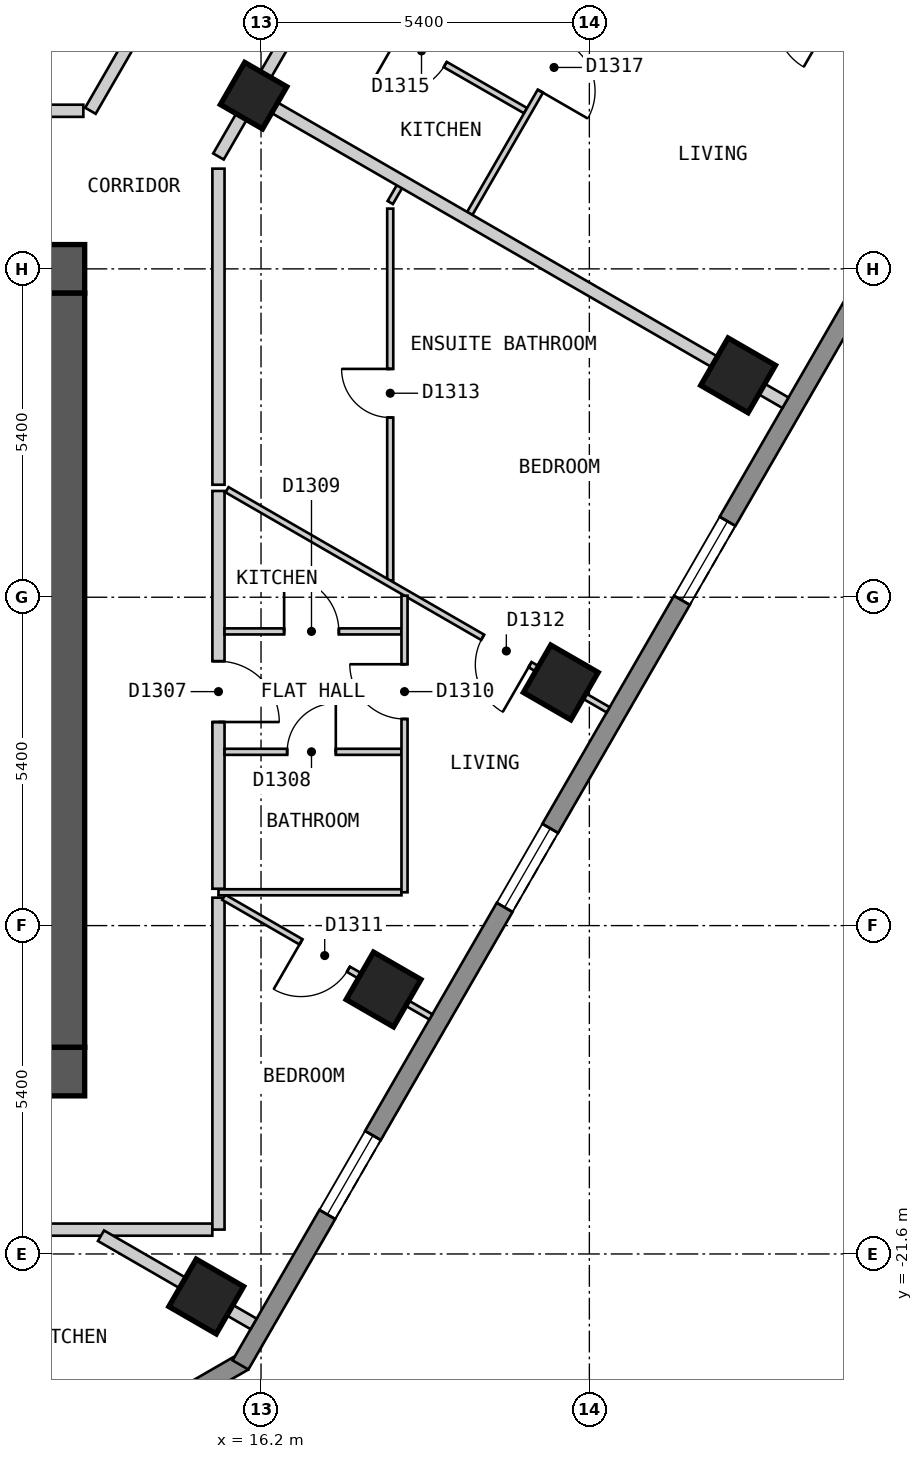
"""IFC4 building model, lengths in metres.
Left out: names, types, materials, properties, quantities, classifications, styles, units other than length and angle.
Written with IfcOpenShell. Run it as: python <this file> out.ifc"""

import sys

from ifc_helpers import new_model, si_unit, direction, frame, frame_2d, origin, origin_2d, place, context, subcontext, project, spatial, polyline, rectangle, outline, extrude, element, fill, save


model = new_model("IFC4")
c1 = context("Model", 3, precision=1e-05, world=origin(), true_north=direction((0.0, 1.0)))
c2 = subcontext(c1, "Body", "Model", "MODEL_VIEW")
j1 = project(units=[si_unit("LENGTHUNIT", "METRE"), si_unit("PLANEANGLEUNIT", "RADIAN")], contexts=[c1])
p1 = place(None, origin())
s1 = spatial("IfcSite", under=j1, at=p1, CompositionType="ELEMENT")
p2 = place(p1, origin())
s2 = spatial("IfcBuilding", under=s1, at=p2, CompositionType="ELEMENT")
p3 = place(p2, frame((0.0, 0.0, 147.6)))
s3 = spatial("IfcBuildingStorey", under=s2, at=p3, CompositionType="ELEMENT", Elevation=147.6)
for number, where, z_axis, x_axis in (
    (1, (15.299, -22.3, 0.0), (0.0, 0.0, 1.0), (0.5, 0.866, 0.0)),
    (2, (18.215, -17.251, 0.0), (0.0, 0.0, 1.0), (0.5, 0.866, 0.0)),
    (3, (21.13, -12.201, 0.0), (0.0, 0.0, 1.0), (0.5, 0.866, 0.0)),
    (4, (24.046, -7.151, 0.0), (0.0, 0.0, 1.0), (0.5, 0.866, 0.0)),
):
    element("IfcColumn", number, at=place(p3, frame(where, z_axis=z_axis, x_axis=x_axis)), inside=s3, PredefinedType="COLUMN", context=c2, shape_type="SweptSolid", body=[
        extrude(rectangle(XDim=0.9, YDim=0.9, at=origin_2d()), origin(), (0.0, 0.0, 1.0), 3.0),
    ])
p4 = place(p3, frame((16.078, -2.551, 0.0), z_axis=(0.0, 0.0, 1.0), x_axis=(0.5, 0.866025403784, 0.0)))
e5 = element("IfcColumn", 5, at=p4, inside=s3, PredefinedType="COLUMN", context=c2, shape_type="SweptSolid", body=[
    extrude(rectangle(XDim=0.8, YDim=0.8, at=origin_2d()), origin(), (0.0, 0.0, 1.0), 3.0),
])
p5 = place(p3, frame((-13.3, -18.6, 0.0), z_axis=(0.0, 0.0, 1.0), x_axis=(1.0, 0.0, 0.0)))
e6 = element("IfcWall", 6, at=p5, inside=s3, PredefinedType="SHEAR", context=c2, shape_type="SweptSolid", body=[
    extrude(rectangle(XDim=26.6, YDim=0.8, at=frame_2d((13.3, 0.0))), origin(), (0.0, 0.0, 1.0), 2.7),
])
p6 = place(p3, frame((-13.3, -5.4, 0.0), z_axis=(0.0, 0.0, 1.0), x_axis=(1.0, 0.0, 0.0)))
e7 = element("IfcWall", 7, at=p6, inside=s3, PredefinedType="SHEAR", context=c2, shape_type="SweptSolid", body=[
    extrude(rectangle(XDim=26.6, YDim=0.8, at=frame_2d((13.3, 0.0))), origin(), (0.0, 0.0, 1.0), 2.7),
])
p7 = place(p6, frame((23.65, 0.0, 0.0)))
e8 = element("IfcOpeningElement", 8, at=p7, cuts=e7, PredefinedType="OPENING", context=c2, shape_type="SweptSolid", body=[
    extrude(rectangle(XDim=1.2, YDim=2.1, at=frame_2d((0.6, 1.05))), frame((0.0, 0.41, 0.0), z_axis=(0.0, -1.0, 0.0), x_axis=(1.0, 0.0, 0.0)), (0.0, 0.0, 1.0), 0.82),
])
p8 = place(p3, frame((12.9, -18.2, 0.0), z_axis=(0.0, 0.0, 1.0), x_axis=(0.0, 1.0, 0.0)))
e9 = element("IfcWall", 9, at=p8, inside=s3, PredefinedType="SHEAR", context=c2, shape_type="SweptSolid", body=[
    extrude(rectangle(XDim=12.4, YDim=0.8, at=frame_2d((6.2, 0.0))), origin(), (0.0, 0.0, 1.0), 2.7),
])
p9 = place(p3, frame((11.587, -25.87, 0.0), z_axis=(0.0, 0.0, 1.0), x_axis=(0.866022959057, 0.500004234368, 0.0)))
e10 = element("IfcWall", 10, at=p9, inside=s3, PredefinedType="SOLIDWALL", context=c2, shape_type="SweptSolid", body=[
    extrude(outline(polyline([(0.0, -0.15), (5.0, -0.15), (4.92, 0.15), (0.08, 0.15), (0.0, -0.15)])), origin(), (0.0, 0.0, 1.0), 2.7),
])
p10 = place(p9, frame((0.65, 0.0, 0.15)))
e11 = element("IfcOpeningElement", 11, at=p10, cuts=e10, PredefinedType="OPENING", context=c2, shape_type="SweptSolid", body=[
    extrude(rectangle(XDim=1.2, YDim=2.1, at=frame_2d((0.6, 1.05))), frame((0.0, 0.16, 0.0), z_axis=(0.0, -1.0, 0.0), x_axis=(1.0, 0.0, 0.0)), (0.0, 0.0, 1.0), 0.32),
])
p11 = place(p3, frame((15.862, -23.425, 0.0), z_axis=(0.0, 0.0, 1.0), x_axis=(0.500017503135, 0.866015298109, 0.0)))
e12 = element("IfcWall", 12, at=p11, inside=s3, PredefinedType="SOLIDWALL", context=c2, shape_type="SweptSolid", body=[
    extrude(outline(polyline([(0.0, -0.15), (24.711, -0.15), (24.631, 0.15), (0.08, 0.15), (0.0, -0.15)])), origin(), (0.0, 0.0, 1.0), 2.7),
])
p12 = place(p11, frame((2.857, 0.0, 0.15)))
e13 = element("IfcOpeningElement", 13, at=p12, cuts=e12, PredefinedType="OPENING", context=c2, shape_type="SweptSolid", body=[
    extrude(rectangle(XDim=1.5, YDim=2.1, at=frame_2d((0.75, 1.05))), frame((0.0, 0.16, 0.0), z_axis=(0.0, -1.0, 0.0), x_axis=(1.0, 0.0, 0.0)), (0.0, 0.0, 1.0), 0.32),
])
p13 = place(p11, frame((8.689, 0.0, 0.15)))
e14 = element("IfcOpeningElement", 14, at=p13, cuts=e12, PredefinedType="OPENING", context=c2, shape_type="SweptSolid", body=[
    extrude(rectangle(XDim=1.5, YDim=2.1, at=frame_2d((0.75, 1.05))), frame((0.0, 0.16, 0.0), z_axis=(0.0, -1.0, 0.0), x_axis=(1.0, 0.0, 0.0)), (0.0, 0.0, 1.0), 0.32),
])
p14 = place(p11, frame((14.52, 0.0, 0.15)))
e15 = element("IfcOpeningElement", 15, at=p14, cuts=e12, PredefinedType="OPENING", context=c2, shape_type="SweptSolid", body=[
    extrude(rectangle(XDim=1.5, YDim=2.1, at=frame_2d((0.75, 1.05))), frame((0.0, 0.16, 0.0), z_axis=(0.0, -1.0, 0.0), x_axis=(1.0, 0.0, 0.0)), (0.0, 0.0, 1.0), 0.32),
])
p15 = place(p11, frame((20.351, 0.0, 0.15)))
e16 = element("IfcOpeningElement", 16, at=p15, cuts=e12, PredefinedType="OPENING", context=c2, shape_type="SweptSolid", body=[
    extrude(rectangle(XDim=1.5, YDim=2.1, at=frame_2d((0.75, 1.05))), frame((0.0, 0.16, 0.0), z_axis=(0.0, -1.0, 0.0), x_axis=(1.0, 0.0, 0.0)), (0.0, 0.0, 1.0), 0.32),
])
p16 = place(p3, frame((15.5, -3.752, 0.0), z_axis=(0.0, 0.0, 1.0), x_axis=(0.0, -1.0, 0.0)))
e17 = element("IfcWall", 17, at=p16, inside=s3, PredefinedType="PARTITIONING", context=c2, shape_type="SweptSolid", body=[
    extrude(rectangle(XDim=5.198, YDim=0.2, at=frame_2d((2.599, 0.0))), origin(), (0.0, 0.0, 1.0), 2.7),
])
p17 = place(p3, frame((-15.4, -21.2, 0.0), z_axis=(0.0, 0.0, 1.0), x_axis=(1.0, 0.0, 0.0)))
e18 = element("IfcWall", 18, at=p17, inside=s3, PredefinedType="PARTITIONING", context=c2, shape_type="SweptSolid", body=[
    extrude(rectangle(XDim=30.799, YDim=0.2, at=frame_2d((15.399, 0.0))), origin(), (0.0, 0.0, 1.0), 2.7),
])
p18 = place(p17, frame((17.643, 0.0, 0.0)))
e19 = element("IfcOpeningElement", 19, at=p18, cuts=e18, PredefinedType="OPENING", context=c2, shape_type="SweptSolid", body=[
    extrude(rectangle(XDim=1.0, YDim=2.1, at=frame_2d((0.5, 1.05))), frame((0.0, 0.11, 0.0), z_axis=(0.0, -1.0, 0.0), x_axis=(1.0, 0.0, 0.0)), (0.0, 0.0, 1.0), 0.22),
])
p19 = place(p17, frame((2.765, 0.0, 0.0)))
e20 = element("IfcOpeningElement", 20, at=p19, cuts=e18, PredefinedType="OPENING", context=c2, shape_type="SweptSolid", body=[
    extrude(rectangle(XDim=0.8, YDim=2.1, at=frame_2d((0.4, 1.05))), frame((0.0, 0.11, 0.0), z_axis=(0.0, -1.0, 0.0), x_axis=(1.0, 0.0, 0.0)), (0.0, 0.0, 1.0), 0.22),
])
p20 = place(p3, frame((7.028, -2.8, 0.0), z_axis=(0.0, 0.0, 1.0), x_axis=(1.0, 0.0, 0.0)))
e21 = element("IfcWall", 21, at=p20, inside=s3, PredefinedType="PARTITIONING", context=c2, shape_type="SweptSolid", body=[
    extrude(rectangle(XDim=6.25, YDim=0.2, at=frame_2d((3.125, 0.0))), origin(), (0.0, 0.0, 1.0), 2.7),
])
p21 = place(p3, frame((13.394, -2.8, 0.0), z_axis=(0.0, 0.0, 1.0), x_axis=(0.499968324138, 0.866043691079, 0.0)))
e22 = element("IfcWall", 22, at=p21, inside=s3, PredefinedType="PARTITIONING", context=c2, shape_type="SweptSolid", body=[
    extrude(rectangle(XDim=3.696, YDim=0.2, at=frame_2d((1.848, 0.0))), origin(), (0.0, 0.0, 1.0), 2.7),
])
p22 = place(p3, frame((15.5, -3.552, 0.0), z_axis=(0.0, 0.0, 1.0), x_axis=(0.499928303779, 0.86606679366, 0.0)))
e23 = element("IfcWall", 23, at=p22, inside=s3, PredefinedType="PARTITIONING", context=c2, shape_type="SweptSolid", body=[
    extrude(rectangle(XDim=4.449, YDim=0.2, at=frame_2d((2.225, 0.0))), origin(), (0.0, 0.0, 1.0), 2.7),
])
p23 = place(p22, frame((3.432, 0.0, 0.0)))
e24 = element("IfcOpeningElement", 24, at=p23, cuts=e23, PredefinedType="OPENING", context=c2, shape_type="SweptSolid", body=[
    extrude(rectangle(XDim=0.8, YDim=2.1, at=frame_2d((0.4, 1.05))), frame((0.0, 0.11, 0.0), z_axis=(0.0, -1.0, 0.0), x_axis=(1.0, 0.0, 0.0)), (0.0, 0.0, 1.0), 0.22),
])
p24 = place(p3, frame((15.5, -21.199, 0.0), z_axis=(0.0, 0.0, 1.0), x_axis=(0.0, 1.0, 0.0)))
e25 = element("IfcWall", 25, at=p24, inside=s3, PredefinedType="PARTITIONING", context=c2, shape_type="SweptSolid", body=[
    extrude(rectangle(XDim=5.458, YDim=0.2, at=frame_2d((2.729, 0.0))), origin(), (0.0, 0.0, 1.0), 2.7),
])
p25 = place(p3, frame((15.5, -15.594, 0.0), z_axis=(0.0, 0.0, 1.0), x_axis=(0.0, 1.0, 0.0)))
e26 = element("IfcWall", 26, at=p25, inside=s3, PredefinedType="PARTITIONING", context=c2, shape_type="SweptSolid", body=[
    extrude(rectangle(XDim=6.542, YDim=0.2, at=frame_2d((3.271, 0.0))), origin(), (0.0, 0.0, 1.0), 2.7),
])
p26 = place(p25, frame((2.742, 0.0, 0.0)))
e27 = element("IfcOpeningElement", 27, at=p26, cuts=e26, PredefinedType="OPENING", context=c2, shape_type="SweptSolid", body=[
    extrude(rectangle(XDim=1.0, YDim=2.1, at=frame_2d((0.5, 1.05))), frame((0.0, 0.11, 0.0), z_axis=(0.0, -1.0, 0.0), x_axis=(1.0, 0.0, 0.0)), (0.0, 0.0, 1.0), 0.22),
])
p27 = place(p3, frame((18.325, -4.409, 0.0), z_axis=(0.0, 0.0, 1.0), x_axis=(0.0, -1.0, 0.0)))
e28 = element("IfcWall", 28, at=p27, inside=s3, PredefinedType="PARTITIONING", context=c2, shape_type="SweptSolid", body=[
    extrude(rectangle(XDim=6.115, YDim=0.1, at=frame_2d((3.058, 0.0))), origin(), (0.0, 0.0, 1.0), 2.7),
])
p28 = place(p27, frame((2.636, 0.0, 0.0)))
e29 = element("IfcOpeningElement", 29, at=p28, cuts=e28, PredefinedType="OPENING", context=c2, shape_type="SweptSolid", body=[
    extrude(rectangle(XDim=0.8, YDim=2.1, at=frame_2d((0.4, 1.05))), frame((0.0, 0.06, 0.0), z_axis=(0.0, -1.0, 0.0), x_axis=(1.0, 0.0, 0.0)), (0.0, 0.0, 1.0), 0.12),
])
p29 = place(p3, frame((15.587, -15.734, 0.0), z_axis=(0.0, 0.0, 1.0), x_axis=(0.866023334807, -0.500003583557, 0.0)))
e30 = element("IfcWall", 30, at=p29, inside=s3, PredefinedType="PARTITIONING", context=c2, shape_type="SweptSolid", body=[
    extrude(rectangle(XDim=3.934, YDim=0.1, at=frame_2d((1.967, 0.0))), origin(), (0.0, 0.0, 1.0), 2.7),
])
p30 = place(p29, frame((1.467, 0.0, 0.0)))
e31 = element("IfcOpeningElement", 31, at=p30, cuts=e30, PredefinedType="OPENING", context=c2, shape_type="SweptSolid", body=[
    extrude(rectangle(XDim=0.9, YDim=2.1, at=frame_2d((0.45, 1.05))), frame((0.0, 0.06, 0.0), z_axis=(0.0, -1.0, 0.0), x_axis=(1.0, 0.0, 0.0)), (0.0, 0.0, 1.0), 0.12),
])
p31 = place(p3, frame((15.641, -9.032, 0.0), z_axis=(0.0, 0.0, 1.0), x_axis=(0.866049104564, -0.499958946799, 0.0)))
e32 = element("IfcWall", 32, at=p31, inside=s3, PredefinedType="PARTITIONING", context=c2, shape_type="SweptSolid", body=[
    extrude(rectangle(XDim=7.238, YDim=0.1, at=frame_2d((3.619, 0.0))), origin(), (0.0, 0.0, 1.0), 2.7),
])
p32 = place(p31, frame((4.854, 0.0, 0.0)))
e33 = element("IfcOpeningElement", 33, at=p32, cuts=e32, PredefinedType="OPENING", context=c2, shape_type="SweptSolid", body=[
    extrude(rectangle(XDim=0.9, YDim=2.1, at=frame_2d((0.45, 1.05))), frame((0.0, 0.06, 0.0), z_axis=(0.0, -1.0, 0.0), x_axis=(1.0, 0.0, 0.0)), (0.0, 0.0, 1.0), 0.12),
])
p33 = place(p3, frame((17.171, -0.857, 0.0), z_axis=(0.0, 0.0, 1.0), x_axis=(0.867173455867, -0.49800622229, 0.0)))
e34 = element("IfcWall", 34, at=p33, inside=s3, PredefinedType="PARTITIONING", context=c2, shape_type="SweptSolid", body=[
    extrude(rectangle(XDim=3.898, YDim=0.1, at=frame_2d((1.949, 0.0))), origin(), (0.0, 0.0, 1.0), 2.7),
])
p34 = place(p33, frame((1.474, 0.0, 0.0)))
e35 = element("IfcOpeningElement", 35, at=p34, cuts=e34, PredefinedType="OPENING", context=c2, shape_type="SweptSolid", body=[
    extrude(rectangle(XDim=0.9, YDim=2.1, at=frame_2d((0.45, 1.05))), frame((0.0, 0.06, 0.0), z_axis=(0.0, -1.0, 0.0), x_axis=(1.0, 0.0, 0.0)), (0.0, 0.0, 1.0), 0.12),
])
p35 = place(p3, frame((22.729, 0.343, 0.0), z_axis=(0.0, 0.0, 1.0), x_axis=(0.865996608848, -0.500049870977, 0.0)))
e36 = element("IfcWall", 36, at=p35, inside=s3, PredefinedType="PARTITIONING", context=c2, shape_type="SweptSolid", body=[
    extrude(rectangle(XDim=5.788, YDim=0.1, at=frame_2d((2.894, 0.0))), origin(), (0.0, 0.0, 1.0), 2.7),
])
p36 = place(p35, frame((2.386, 0.0, 0.0)))
e37 = element("IfcOpeningElement", 37, at=p36, cuts=e36, PredefinedType="OPENING", context=c2, shape_type="SweptSolid", body=[
    extrude(rectangle(XDim=0.9, YDim=2.1, at=frame_2d((0.45, 1.05))), frame((0.0, 0.06, 0.0), z_axis=(0.0, -1.0, 0.0), x_axis=(1.0, 0.0, 0.0)), (0.0, 0.0, 1.0), 0.12),
])
p37 = place(p3, frame((15.6, -11.362, 0.0), z_axis=(0.0, 0.0, 1.0), x_axis=(1.0, 0.0, 0.0)))
e38 = element("IfcWall", 38, at=p37, inside=s3, PredefinedType="PARTITIONING", context=c2, shape_type="SweptSolid", body=[
    extrude(rectangle(XDim=2.91, YDim=0.1, at=frame_2d((1.455, 0.0))), origin(), (0.0, 0.0, 1.0), 2.7),
])
p38 = place(p37, frame((0.98, 0.0, 0.0)))
e39 = element("IfcOpeningElement", 39, at=p38, cuts=e38, PredefinedType="OPENING", context=c2, shape_type="SweptSolid", body=[
    extrude(rectangle(XDim=0.9, YDim=2.1, at=frame_2d((0.45, 1.05))), frame((0.0, 0.06, 0.0), z_axis=(0.0, -1.0, 0.0), x_axis=(1.0, 0.0, 0.0)), (0.0, 0.0, 1.0), 0.12),
])
p39 = place(p3, frame((15.6, -13.342, 0.0), z_axis=(0.0, 0.0, 1.0), x_axis=(1.0, 0.0, 0.0)))
e40 = element("IfcWall", 40, at=p39, inside=s3, PredefinedType="PARTITIONING", context=c2, shape_type="SweptSolid", body=[
    extrude(rectangle(XDim=2.91, YDim=0.1, at=frame_2d((1.455, 0.0))), origin(), (0.0, 0.0, 1.0), 2.7),
])
p40 = place(p39, frame((1.03, 0.0, 0.0)))
e41 = element("IfcOpeningElement", 41, at=p40, cuts=e40, PredefinedType="OPENING", context=c2, shape_type="SweptSolid", body=[
    extrude(rectangle(XDim=0.8, YDim=2.1, at=frame_2d((0.4, 1.05))), frame((0.0, 0.06, 0.0), z_axis=(0.0, -1.0, 0.0), x_axis=(1.0, 0.0, 0.0)), (0.0, 0.0, 1.0), 0.12),
])
p41 = place(p3, frame((15.5, -15.652, 0.0), z_axis=(0.0, 0.0, 1.0), x_axis=(1.0, 0.0, 0.0)))
e42 = element("IfcWall", 42, at=p41, inside=s3, PredefinedType="PARTITIONING", context=c2, shape_type="SweptSolid", body=[
    extrude(rectangle(XDim=3.01, YDim=0.1, at=frame_2d((1.505, 0.0))), origin(), (0.0, 0.0, 1.0), 2.7),
])
p42 = place(p3, frame((18.325, -4.309, 0.0), z_axis=(0.0, 0.0, 1.0), x_axis=(0.5014706583, 0.865174652232, 0.0)))
e43 = element("IfcWall", 43, at=p42, inside=s3, PredefinedType="PARTITIONING", context=c2, shape_type="SweptSolid", body=[
    extrude(rectangle(XDim=0.399, YDim=0.1, at=frame_2d((0.199, 0.0))), origin(), (0.0, 0.0, 1.0), 2.7),
])
p43 = place(p3, frame((19.633, -4.488, 0.0), z_axis=(0.0, 0.0, 1.0), x_axis=(0.499989971015, 0.866031193944, 0.0)))
e44 = element("IfcWall", 44, at=p43, inside=s3, PredefinedType="PARTITIONING", context=c2, shape_type="SweptSolid", body=[
    extrude(rectangle(XDim=5.53, YDim=0.1, at=frame_2d((2.765, 0.0))), origin(), (0.0, 0.0, 1.0), 2.7),
])
p44 = place(p43, frame((2.322, 0.0, 0.0)))
e45 = element("IfcOpeningElement", 45, at=p44, cuts=e44, PredefinedType="OPENING", context=c2, shape_type="SweptSolid", body=[
    extrude(rectangle(XDim=0.9, YDim=2.1, at=frame_2d((0.45, 1.05))), frame((0.0, 0.06, 0.0), z_axis=(0.0, -1.0, 0.0), x_axis=(1.0, 0.0, 0.0)), (0.0, 0.0, 1.0), 0.12),
])
p45 = place(p3, frame((18.56, -15.652, 0.0), z_axis=(0.0, 0.0, 1.0), x_axis=(0.0, 1.0, 0.0)))
e46 = element("IfcWall", 46, at=p45, inside=s3, PredefinedType="PARTITIONING", context=c2, shape_type="SweptSolid", body=[
    extrude(rectangle(XDim=4.877, YDim=0.1, at=frame_2d((2.438, 0.0))), origin(), (0.0, 0.0, 1.0), 2.7),
])
p46 = place(p45, frame((2.85, 0.0, 0.0)))
e47 = element("IfcOpeningElement", 47, at=p46, cuts=e46, PredefinedType="OPENING", context=c2, shape_type="SweptSolid", body=[
    extrude(rectangle(XDim=0.9, YDim=2.1, at=frame_2d((0.45, 1.05))), frame((0.0, 0.06, 0.0), z_axis=(0.0, -1.0, 0.0), x_axis=(1.0, 0.0, 0.0)), (0.0, 0.0, 1.0), 0.12),
])
p47 = place(p3, frame((13.568, -21.3, 0.0), z_axis=(0.0, 0.0, 1.0), x_axis=(0.865885342641, -0.500242514586, 0.0)))
e48 = element("IfcWall", 48, at=p47, inside=s3, PredefinedType="PARTITIONING", context=c2, shape_type="SweptSolid", body=[
    extrude(rectangle(XDim=2.898, YDim=0.2, at=frame_2d((1.449, 0.0))), origin(), (0.0, 0.0, 1.0), 2.7),
])
p48 = place(p3, frame((16.165, -2.601, 0.0), z_axis=(0.0, 0.0, 1.0), x_axis=(0.866016855193, -0.500014806302, 0.0)))
e49 = element("IfcWall", 49, at=p48, inside=s3, PredefinedType="PARTITIONING", context=c2, shape_type="SweptSolid", body=[
    extrude(rectangle(XDim=10.0, YDim=0.2, at=frame_2d((5.0, 0.0))), origin(), (0.0, 0.0, 1.0), 2.7),
])
p49 = place(p12, origin())
e50 = element("IfcWindow", 50, at=p49, inside=s3, PartitioningType="SINGLE_PANEL", PredefinedType="WINDOW", context=c2, shape_type="SweptSolid", body=[
    extrude(rectangle(XDim=1.5, YDim=2.1, at=frame_2d((0.75, 1.05))), frame((0.0, 0.03, 0.0), z_axis=(0.0, -1.0, 0.0), x_axis=(1.0, 0.0, 0.0)), (0.0, 0.0, 1.0), 0.06),
])
fill(e13, e50)
p50 = place(p13, origin())
e51 = element("IfcWindow", 51, at=p50, inside=s3, PartitioningType="SINGLE_PANEL", PredefinedType="WINDOW", context=c2, shape_type="SweptSolid", body=[
    extrude(rectangle(XDim=1.5, YDim=2.1, at=frame_2d((0.75, 1.05))), frame((0.0, 0.03, 0.0), z_axis=(0.0, -1.0, 0.0), x_axis=(1.0, 0.0, 0.0)), (0.0, 0.0, 1.0), 0.06),
])
fill(e14, e51)
p51 = place(p14, origin())
e52 = element("IfcWindow", 52, at=p51, inside=s3, PartitioningType="SINGLE_PANEL", PredefinedType="WINDOW", context=c2, shape_type="SweptSolid", body=[
    extrude(rectangle(XDim=1.5, YDim=2.1, at=frame_2d((0.75, 1.05))), frame((0.0, 0.03, 0.0), z_axis=(0.0, -1.0, 0.0), x_axis=(1.0, 0.0, 0.0)), (0.0, 0.0, 1.0), 0.06),
])
fill(e15, e52)
p52 = place(p26, origin())
e53 = element("IfcDoor", 53, at=p52, inside=s3, OperationType="SINGLE_SWING_LEFT", PredefinedType="DOOR", context=c2, shape_type="SweptSolid", body=[
    extrude(rectangle(XDim=1.0, YDim=2.1, at=frame_2d((0.5, 1.05))), frame((0.0, 0.025, 0.0), z_axis=(0.0, -1.0, 0.0), x_axis=(1.0, 0.0, 0.0)), (0.0, 0.0, 1.0), 0.05),
])
fill(e27, e53)
p53 = place(p40, origin())
e54 = element("IfcDoor", 54, at=p53, inside=s3, OperationType="SINGLE_SWING_RIGHT", PredefinedType="DOOR", context=c2, shape_type="SweptSolid", body=[
    extrude(rectangle(XDim=0.8, YDim=2.1, at=frame_2d((0.4, 1.05))), frame((0.0, 0.025, 0.0), z_axis=(0.0, -1.0, 0.0), x_axis=(1.0, 0.0, 0.0)), (0.0, 0.0, 1.0), 0.05),
])
fill(e41, e54)
p54 = place(p38, origin())
e55 = element("IfcDoor", 55, at=p54, inside=s3, OperationType="SINGLE_SWING_LEFT", PredefinedType="DOOR", context=c2, shape_type="SweptSolid", body=[
    extrude(rectangle(XDim=0.9, YDim=2.1, at=frame_2d((0.45, 1.05))), frame((0.0, 0.025, 0.0), z_axis=(0.0, -1.0, 0.0), x_axis=(1.0, 0.0, 0.0)), (0.0, 0.0, 1.0), 0.05),
])
fill(e39, e55)
p55 = place(p46, origin())
e56 = element("IfcDoor", 56, at=p55, inside=s3, OperationType="SINGLE_SWING_RIGHT", PredefinedType="DOOR", context=c2, shape_type="SweptSolid", body=[
    extrude(rectangle(XDim=0.9, YDim=2.1, at=frame_2d((0.45, 1.05))), frame((0.0, 0.025, 0.0), z_axis=(0.0, -1.0, 0.0), x_axis=(1.0, 0.0, 0.0)), (0.0, 0.0, 1.0), 0.05),
])
fill(e47, e56)
p56 = place(p30, origin())
e57 = element("IfcDoor", 57, at=p56, inside=s3, OperationType="SINGLE_SWING_LEFT", PredefinedType="DOOR", context=c2, shape_type="SweptSolid", body=[
    extrude(rectangle(XDim=0.9, YDim=2.1, at=frame_2d((0.45, 1.05))), frame((0.0, 0.025, 0.0), z_axis=(0.0, -1.0, 0.0), x_axis=(1.0, 0.0, 0.0)), (0.0, 0.0, 1.0), 0.05),
])
fill(e31, e57)
p57 = place(p32, origin())
e58 = element("IfcDoor", 58, at=p57, inside=s3, OperationType="SINGLE_SWING_RIGHT", PredefinedType="DOOR", context=c2, shape_type="SweptSolid", body=[
    extrude(rectangle(XDim=0.9, YDim=2.1, at=frame_2d((0.45, 1.05))), frame((0.0, 0.025, 0.0), z_axis=(0.0, -1.0, 0.0), x_axis=(1.0, 0.0, 0.0)), (0.0, 0.0, 1.0), 0.05),
])
fill(e33, e58)
p58 = place(p28, origin())
e59 = element("IfcDoor", 59, at=p58, inside=s3, OperationType="SINGLE_SWING_LEFT", PredefinedType="DOOR", context=c2, shape_type="SweptSolid", body=[
    extrude(rectangle(XDim=0.8, YDim=2.1, at=frame_2d((0.4, 1.05))), frame((0.0, 0.025, 0.0), z_axis=(0.0, -1.0, 0.0), x_axis=(1.0, 0.0, 0.0)), (0.0, 0.0, 1.0), 0.05),
])
fill(e29, e59)
p59 = place(p34, origin())
e60 = element("IfcDoor", 60, at=p59, inside=s3, OperationType="SINGLE_SWING_LEFT", PredefinedType="DOOR", context=c2, shape_type="SweptSolid", body=[
    extrude(rectangle(XDim=0.9, YDim=2.1, at=frame_2d((0.45, 1.05))), frame((0.0, 0.025, 0.0), z_axis=(0.0, -1.0, 0.0), x_axis=(1.0, 0.0, 0.0)), (0.0, 0.0, 1.0), 0.05),
])
fill(e35, e60)
p60 = place(p44, origin())
e61 = element("IfcDoor", 61, at=p60, inside=s3, OperationType="SINGLE_SWING_LEFT", PredefinedType="DOOR", context=c2, shape_type="SweptSolid", body=[
    extrude(rectangle(XDim=0.9, YDim=2.1, at=frame_2d((0.45, 1.05))), frame((0.0, 0.025, 0.0), z_axis=(0.0, -1.0, 0.0), x_axis=(1.0, 0.0, 0.0)), (0.0, 0.0, 1.0), 0.05),
])
fill(e45, e61)
save(model, sys.argv[1])
